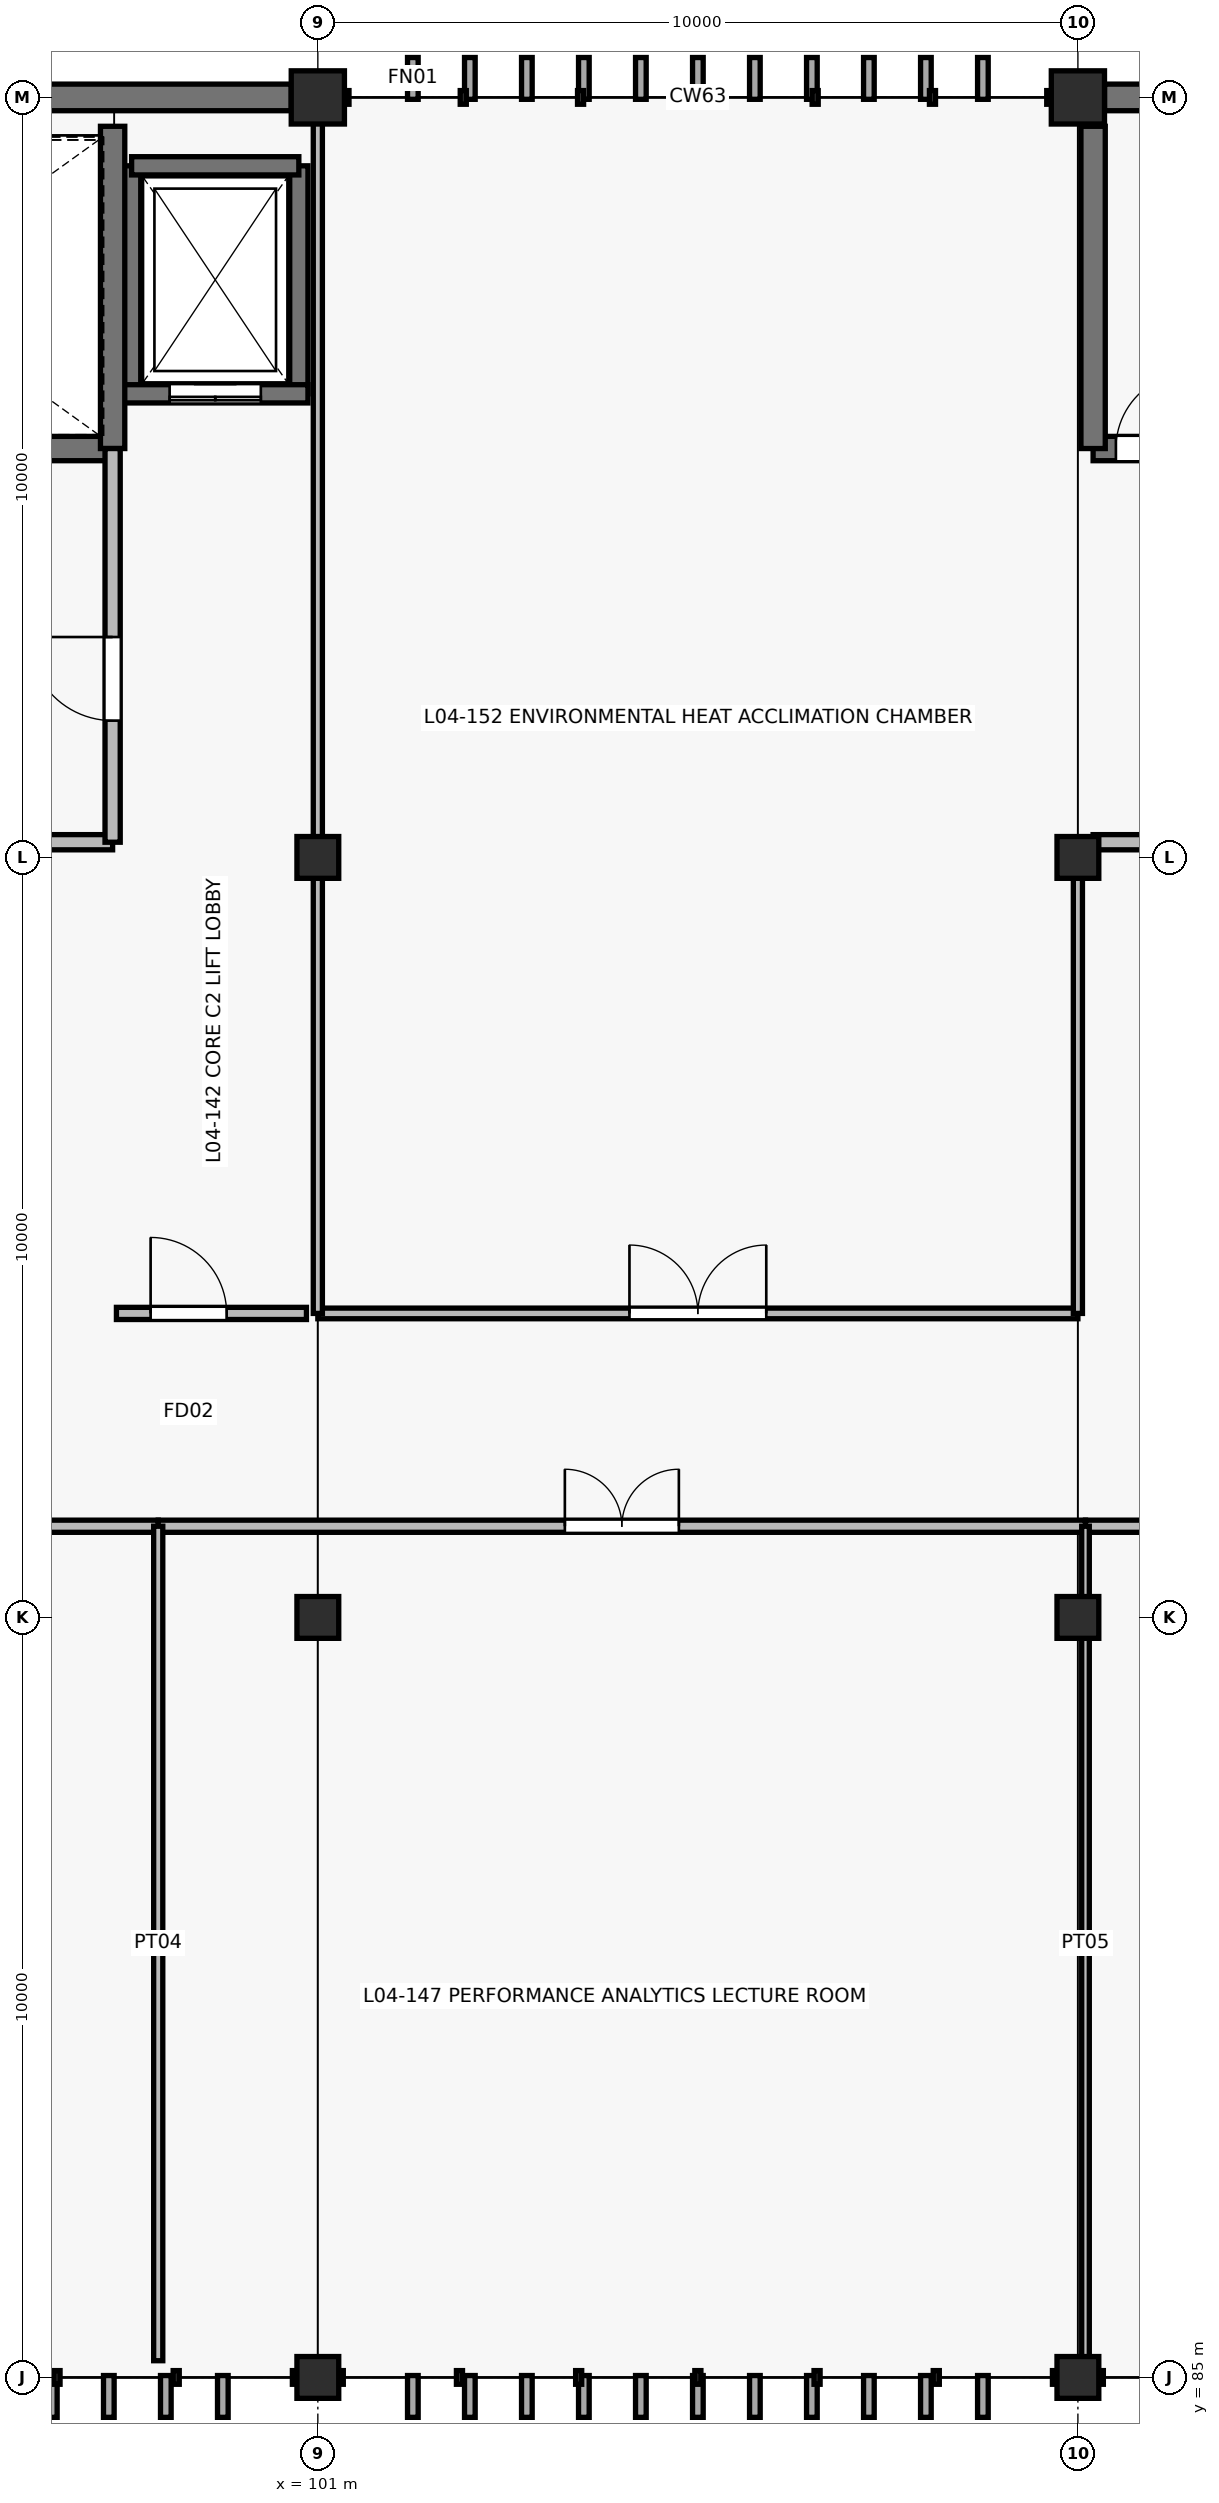
"""IFC4 building model, lengths in metres.
Left out: names, types, materials, properties, quantities, classifications, styles, units other than length and angle.
Written with IfcOpenShell. Run it as: python <this file> out.ifc"""

import sys

from ifc_helpers import new_model, si_unit, direction, frame, frame_2d, origin, origin_2d, place, context, subcontext, project, spatial, rectangle, circle, extrude, element, fill, save


model = new_model("IFC4")
c1 = context("Model", 3, precision=1e-05, world=origin(), true_north=direction((0.0, 1.0)))
c2 = subcontext(c1, "Body", "Model", "MODEL_VIEW")
j1 = project(units=[si_unit("LENGTHUNIT", "METRE"), si_unit("PLANEANGLEUNIT", "RADIAN")], contexts=[c1])
p1 = place(None, origin())
s1 = spatial("IfcSite", under=j1, at=p1, CompositionType="ELEMENT")
p2 = place(p1, origin())
s2 = spatial("IfcBuilding", under=s1, at=p2, CompositionType="ELEMENT")
p3 = place(p2, frame((0.0, 0.0, 17.4)))
s3 = spatial("IfcBuildingStorey", under=s2, at=p3, CompositionType="ELEMENT", Elevation=17.4)
for number, where, z_axis, x_axis in (
    (1, (101.0, 85.0, 0.0), (0.0, 0.0, 1.0), (1.0, 0.0, 0.0)),
    (2, (101.0, 95.0, 0.0), (0.0, 0.0, 1.0), (1.0, 0.0, 0.0)),
    (3, (101.0, 105.0, 0.0), (0.0, 0.0, 1.0), (1.0, 0.0, 0.0)),
):
    element("IfcColumn", number, at=place(p3, frame(where, z_axis=z_axis, x_axis=x_axis)), inside=s3, PredefinedType="COLUMN", context=c2, shape_type="SweptSolid", body=[
        extrude(rectangle(XDim=0.55, YDim=0.55, at=origin_2d()), origin(), (0.0, 0.0, 1.0), 4.2),
    ])
p4 = place(p3, frame((101.0, 115.0, 0.0), z_axis=(0.0, 0.0, 1.0), x_axis=(1.0, 0.0, 0.0)))
e4 = element("IfcColumn", 4, at=p4, inside=s3, PredefinedType="COLUMN", context=c2, shape_type="SweptSolid", body=[
    extrude(circle(Radius=0.35, at=origin_2d()), origin(), (0.0, 0.0, 1.0), 4.2),
])
for number, where, z_axis, x_axis in (
    (5, (111.0, 85.0, 0.0), (0.0, 0.0, 1.0), (1.0, 0.0, 0.0)),
    (6, (111.0, 95.0, 0.0), (0.0, 0.0, 1.0), (1.0, 0.0, 0.0)),
    (7, (111.0, 105.0, 0.0), (0.0, 0.0, 1.0), (1.0, 0.0, 0.0)),
):
    element("IfcColumn", number, at=place(p3, frame(where, z_axis=z_axis, x_axis=x_axis)), inside=s3, PredefinedType="COLUMN", context=c2, shape_type="SweptSolid", body=[
        extrude(rectangle(XDim=0.55, YDim=0.55, at=origin_2d()), origin(), (0.0, 0.0, 1.0), 4.2),
    ])
p5 = place(p3, frame((111.0, 115.0, 0.0), z_axis=(0.0, 0.0, 1.0), x_axis=(1.0, 0.0, 0.0)))
e8 = element("IfcColumn", 8, at=p5, inside=s3, PredefinedType="COLUMN", context=c2, shape_type="SweptSolid", body=[
    extrude(circle(Radius=0.35, at=origin_2d()), origin(), (0.0, 0.0, 1.0), 4.2),
])
p6 = place(p3, frame((91.35, 115.0, 0.0), z_axis=(0.0, 0.0, 1.0), x_axis=(1.0, 0.0, 0.0)))
e9 = element("IfcWall", 9, at=p6, inside=s3, PredefinedType="SOLIDWALL", context=c2, shape_type="SweptSolid", body=[
    extrude(rectangle(XDim=9.3, YDim=0.35, at=frame_2d((4.65, 0.0))), origin(), (0.0, 0.0, 1.0), 4.2),
])
p7 = place(p6, frame((2.2, 0.0, 1.0)))
e10 = element("IfcOpeningElement", 10, at=p7, cuts=e9, PredefinedType="OPENING", context=c2, shape_type="SweptSolid", body=[
    extrude(rectangle(XDim=2.4, YDim=1.5, at=frame_2d((1.2, 0.75))), frame((0.0, 0.185, 0.0), z_axis=(0.0, -1.0, 0.0), x_axis=(1.0, 0.0, 0.0)), (0.0, 0.0, 1.0), 0.37),
])
p8 = place(p3, frame((111.35, 115.0, 0.0), z_axis=(0.0, 0.0, 1.0), x_axis=(1.0, 0.0, 0.0)))
e11 = element("IfcWall", 11, at=p8, inside=s3, PredefinedType="SOLIDWALL", context=c2, shape_type="SweptSolid", body=[
    extrude(rectangle(XDim=9.3, YDim=0.35, at=frame_2d((4.65, 0.0))), origin(), (0.0, 0.0, 1.0), 4.2),
])
p9 = place(p8, frame((2.2, 0.0, 1.0)))
e12 = element("IfcOpeningElement", 12, at=p9, cuts=e11, PredefinedType="OPENING", context=c2, shape_type="SweptSolid", body=[
    extrude(rectangle(XDim=1.2, YDim=1.8, at=frame_2d((0.6, 0.9))), frame((0.0, 0.185, 0.0), z_axis=(0.0, -1.0, 0.0), x_axis=(1.0, 0.0, 0.0)), (0.0, 0.0, 1.0), 0.37),
])
for number, where, z_axis, x_axis in (
    (13, (98.55, 111.1, 0.0), (0.0, 0.0, 1.0), (0.0, 1.0, 0.0)),
    (14, (100.75, 114.1, 0.0), (0.0, 0.0, 1.0), (0.0, -1.0, 0.0)),
):
    element("IfcWall", number, at=place(p3, frame(where, z_axis=z_axis, x_axis=x_axis)), inside=s3, PredefinedType="SHEAR", context=c2, shape_type="SweptSolid", body=[
        extrude(rectangle(XDim=3.0, YDim=0.24, at=frame_2d((1.5, 0.0))), origin(), (0.0, 0.0, 1.0), 4.2),
    ])
p10 = place(p3, frame((98.55, 114.1, 0.0), z_axis=(0.0, 0.0, 1.0), x_axis=(1.0, 0.0, 0.0)))
e15 = element("IfcWall", 15, at=p10, inside=s3, PredefinedType="SHEAR", context=c2, shape_type="SweptSolid", body=[
    extrude(rectangle(XDim=2.2, YDim=0.24, at=frame_2d((1.1, 0.0))), origin(), (0.0, 0.0, 1.0), 4.2),
])
p11 = place(p3, frame((100.87, 111.1, 0.0), z_axis=(0.0, 0.0, 1.0), x_axis=(-1.0, 0.0, 0.0)))
e16 = element("IfcWall", 16, at=p11, inside=s3, PredefinedType="SHEAR", context=c2, shape_type="SweptSolid", body=[
    extrude(rectangle(XDim=2.44, YDim=0.24, at=frame_2d((1.22, 0.0))), origin(), (0.0, 0.0, 1.0), 4.2),
])
p12 = place(p11, frame((0.62, 0.0, 0.0)))
e17 = element("IfcOpeningElement", 17, at=p12, cuts=e16, PredefinedType="OPENING", context=c2, shape_type="SweptSolid", body=[
    extrude(rectangle(XDim=1.2, YDim=2.15, at=frame_2d((0.6, 1.075))), frame((0.0, 0.13, 0.0), z_axis=(0.0, -1.0, 0.0), x_axis=(1.0, 0.0, 0.0)), (0.0, 0.0, 1.0), 0.26),
])
p13 = place(p3, frame((91.2, 110.38, 0.0), z_axis=(0.0, 0.0, 1.0), x_axis=(1.0, 0.0, 0.0)))
e18 = element("IfcWall", 18, at=p13, inside=s3, PredefinedType="SHEAR", context=c2, shape_type="SweptSolid", body=[
    extrude(rectangle(XDim=7.1, YDim=0.32, at=frame_2d((3.55, 0.0))), origin(), (0.0, 0.0, 1.0), 4.2),
])
p14 = place(p13, frame((0.3, 0.0, 0.0)))
e19 = element("IfcOpeningElement", 19, at=p14, cuts=e18, PredefinedType="OPENING", context=c2, shape_type="SweptSolid", body=[
    extrude(rectangle(XDim=1.0, YDim=2.15, at=frame_2d((0.5, 1.075))), frame((0.0, 0.17, 0.0), z_axis=(0.0, -1.0, 0.0), x_axis=(1.0, 0.0, 0.0)), (0.0, 0.0, 1.0), 0.34),
])
p15 = place(p3, frame((98.3, 110.38, 0.0), z_axis=(0.0, 0.0, 1.0), x_axis=(0.0, 1.0, 0.0)))
e20 = element("IfcWall", 20, at=p15, inside=s3, PredefinedType="SHEAR", context=c2, shape_type="SweptSolid", body=[
    extrude(rectangle(XDim=4.24, YDim=0.32, at=frame_2d((2.12, 0.0))), origin(), (0.0, 0.0, 1.0), 4.2),
])
p16 = place(p3, frame((91.2, 105.2, 0.0), z_axis=(0.0, 0.0, 1.0), x_axis=(1.0, 0.0, 0.0)))
e21 = element("IfcWall", 21, at=p16, inside=s3, PredefinedType="PARTITIONING", context=c2, shape_type="SweptSolid", body=[
    extrude(rectangle(XDim=7.1, YDim=0.2, at=frame_2d((3.55, 0.0))), origin(), (0.0, 0.0, 1.0), 2.975),
])
p17 = place(p16, frame((2.2, 0.0, 0.0)))
e22 = element("IfcOpeningElement", 22, at=p17, cuts=e21, PredefinedType="OPENING", context=c2, shape_type="SweptSolid", body=[
    extrude(rectangle(XDim=1.6, YDim=2.2, at=frame_2d((0.8, 1.1))), frame((0.0, 0.11, 0.0), z_axis=(0.0, -1.0, 0.0), x_axis=(1.0, 0.0, 0.0)), (0.0, 0.0, 1.0), 0.22),
])
p18 = place(p3, frame((98.3, 105.2, 0.0), z_axis=(0.0, 0.0, 1.0), x_axis=(0.0, 1.0, 0.0)))
e23 = element("IfcWall", 23, at=p18, inside=s3, PredefinedType="PARTITIONING", context=c2, shape_type="SweptSolid", body=[
    extrude(rectangle(XDim=5.18, YDim=0.2, at=frame_2d((2.59, 0.0))), origin(), (0.0, 0.0, 1.0), 2.975),
])
p19 = place(p18, frame((1.6, 0.0, 0.0)))
e24 = element("IfcOpeningElement", 24, at=p19, cuts=e23, PredefinedType="OPENING", context=c2, shape_type="SweptSolid", body=[
    extrude(rectangle(XDim=1.1, YDim=2.15, at=frame_2d((0.55, 1.075))), frame((0.0, 0.11, 0.0), z_axis=(0.0, -1.0, 0.0), x_axis=(1.0, 0.0, 0.0)), (0.0, 0.0, 1.0), 0.22),
])
p20 = place(p3, frame((98.35, 99.0, 0.0), z_axis=(0.0, 0.0, 1.0), x_axis=(1.0, 0.0, 0.0)))
e25 = element("IfcWall", 25, at=p20, inside=s3, PredefinedType="PARTITIONING", context=c2, shape_type="SweptSolid", body=[
    extrude(rectangle(XDim=2.5, YDim=0.16, at=frame_2d((1.25, 0.0))), origin(), (0.0, 0.0, 1.0), 2.975),
])
p21 = place(p20, frame((0.45, 0.0, 0.0)))
e26 = element("IfcOpeningElement", 26, at=p21, cuts=e25, PredefinedType="OPENING", context=c2, shape_type="SweptSolid", body=[
    extrude(rectangle(XDim=1.0, YDim=2.15, at=frame_2d((0.5, 1.075))), frame((0.0, 0.09, 0.0), z_axis=(0.0, -1.0, 0.0), x_axis=(1.0, 0.0, 0.0)), (0.0, 0.0, 1.0), 0.18),
])
p22 = place(p3, frame((111.2, 110.38, 0.0), z_axis=(0.0, 0.0, 1.0), x_axis=(1.0, 0.0, 0.0)))
e27 = element("IfcWall", 27, at=p22, inside=s3, PredefinedType="SHEAR", context=c2, shape_type="SweptSolid", body=[
    extrude(rectangle(XDim=7.1, YDim=0.32, at=frame_2d((3.55, 0.0))), origin(), (0.0, 0.0, 1.0), 4.2),
])
p23 = place(p22, frame((0.3, 0.0, 0.0)))
e28 = element("IfcOpeningElement", 28, at=p23, cuts=e27, PredefinedType="OPENING", context=c2, shape_type="SweptSolid", body=[
    extrude(rectangle(XDim=1.0, YDim=2.15, at=frame_2d((0.5, 1.075))), frame((0.0, 0.17, 0.0), z_axis=(0.0, -1.0, 0.0), x_axis=(1.0, 0.0, 0.0)), (0.0, 0.0, 1.0), 0.34),
])
p24 = place(p3, frame((111.2, 114.62, 0.0), z_axis=(0.0, 0.0, 1.0), x_axis=(0.0, -1.0, 0.0)))
e29 = element("IfcWall", 29, at=p24, inside=s3, PredefinedType="SHEAR", context=c2, shape_type="SweptSolid", body=[
    extrude(rectangle(XDim=4.24, YDim=0.32, at=frame_2d((2.12, 0.0))), origin(), (0.0, 0.0, 1.0), 4.2),
])
p25 = place(p3, frame((111.2, 105.2, 0.0), z_axis=(0.0, 0.0, 1.0), x_axis=(1.0, 0.0, 0.0)))
e30 = element("IfcWall", 30, at=p25, inside=s3, PredefinedType="PARTITIONING", context=c2, shape_type="SweptSolid", body=[
    extrude(rectangle(XDim=7.1, YDim=0.2, at=frame_2d((3.55, 0.0))), origin(), (0.0, 0.0, 1.0), 2.975),
])
p26 = place(p25, frame((2.2, 0.0, 0.0)))
e31 = element("IfcOpeningElement", 31, at=p26, cuts=e30, PredefinedType="OPENING", context=c2, shape_type="SweptSolid", body=[
    extrude(rectangle(XDim=1.6, YDim=2.2, at=frame_2d((0.8, 1.1))), frame((0.0, 0.11, 0.0), z_axis=(0.0, -1.0, 0.0), x_axis=(1.0, 0.0, 0.0)), (0.0, 0.0, 1.0), 0.22),
])
p27 = place(p3, frame((79.1, 96.2, 0.0), z_axis=(0.0, 0.0, 1.0), x_axis=(1.0, 0.0, 0.0)))
e32 = element("IfcWall", 32, at=p27, inside=s3, PredefinedType="PARTITIONING", context=c2, shape_type="SweptSolid", body=[
    extrude(rectangle(XDim=19.8, YDim=0.16, at=frame_2d((9.9, 0.0))), origin(), (0.0, 0.0, 1.0), 2.975),
])
p28 = place(p27, frame((8.2, 0.0, 0.0)))
e33 = element("IfcOpeningElement", 33, at=p28, cuts=e32, PredefinedType="OPENING", context=c2, shape_type="SweptSolid", body=[
    extrude(rectangle(XDim=1.4, YDim=2.2, at=frame_2d((0.7, 1.1))), frame((0.0, 0.09, 0.0), z_axis=(0.0, -1.0, 0.0), x_axis=(1.0, 0.0, 0.0)), (0.0, 0.0, 1.0), 0.18),
])
p29 = place(p3, frame((98.9, 96.2, 0.0), z_axis=(0.0, 0.0, 1.0), x_axis=(1.0, 0.0, 0.0)))
e34 = element("IfcWall", 34, at=p29, inside=s3, PredefinedType="PARTITIONING", context=c2, shape_type="SweptSolid", body=[
    extrude(rectangle(XDim=12.2, YDim=0.16, at=frame_2d((6.1, 0.0))), origin(), (0.0, 0.0, 1.0), 2.975),
])
p30 = place(p29, frame((5.35, 0.0, 0.0)))
e35 = element("IfcOpeningElement", 35, at=p30, cuts=e34, PredefinedType="OPENING", context=c2, shape_type="SweptSolid", body=[
    extrude(rectangle(XDim=1.5, YDim=2.2, at=frame_2d((0.75, 1.1))), frame((0.0, 0.09, 0.0), z_axis=(0.0, -1.0, 0.0), x_axis=(1.0, 0.0, 0.0)), (0.0, 0.0, 1.0), 0.18),
])
p31 = place(p3, frame((98.9, 85.22, 0.0), z_axis=(0.0, 0.0, 1.0), x_axis=(0.0, 1.0, 0.0)))
e36 = element("IfcWall", 36, at=p31, inside=s3, PredefinedType="PARTITIONING", context=c2, shape_type="SweptSolid", body=[
    extrude(rectangle(XDim=10.98, YDim=0.12, at=frame_2d((5.49, 0.0))), origin(), (0.0, 0.0, 1.0), 2.975),
])
p32 = place(p3, frame((111.1, 96.2, 0.0), z_axis=(0.0, 0.0, 1.0), x_axis=(1.0, 0.0, 0.0)))
e37 = element("IfcWall", 37, at=p32, inside=s3, PredefinedType="PARTITIONING", context=c2, shape_type="SweptSolid", body=[
    extrude(rectangle(XDim=5.0, YDim=0.16, at=frame_2d((2.5, 0.0))), origin(), (0.0, 0.0, 1.0), 2.975),
])
p33 = place(p32, frame((2.0, 0.0, 0.0)))
e38 = element("IfcOpeningElement", 38, at=p33, cuts=e37, PredefinedType="OPENING", context=c2, shape_type="SweptSolid", body=[
    extrude(rectangle(XDim=0.98, YDim=2.1, at=frame_2d((0.49, 1.05))), frame((0.0, 0.09, 0.0), z_axis=(0.0, -1.0, 0.0), x_axis=(1.0, 0.0, 0.0)), (0.0, 0.0, 1.0), 0.18),
])
p34 = place(p3, frame((111.1, 85.22, 0.0), z_axis=(0.0, 0.0, 1.0), x_axis=(0.0, 1.0, 0.0)))
e39 = element("IfcWall", 39, at=p34, inside=s3, PredefinedType="PARTITIONING", context=c2, shape_type="SweptSolid", body=[
    extrude(rectangle(XDim=10.98, YDim=0.1, at=frame_2d((5.49, 0.0))), origin(), (0.0, 0.0, 1.0), 2.975),
])
p35 = place(p3, frame((101.0, 99.0, 0.0), z_axis=(0.0, 0.0, 1.0), x_axis=(1.0, 0.0, 0.0)))
e40 = element("IfcWall", 40, at=p35, inside=s3, PredefinedType="PARTITIONING", context=c2, shape_type="SweptSolid", body=[
    extrude(rectangle(XDim=10.0, YDim=0.14, at=frame_2d((5.0, 0.0))), origin(), (0.0, 0.0, 1.0), 2.975),
])
p36 = place(p35, frame((4.1, 0.0, 0.0)))
e41 = element("IfcOpeningElement", 41, at=p36, cuts=e40, PredefinedType="OPENING", context=c2, shape_type="SweptSolid", body=[
    extrude(rectangle(XDim=1.8, YDim=2.25, at=frame_2d((0.9, 1.125))), frame((0.0, 0.08, 0.0), z_axis=(0.0, -1.0, 0.0), x_axis=(1.0, 0.0, 0.0)), (0.0, 0.0, 1.0), 0.16),
])
p37 = place(p3, frame((101.0, 99.0, 0.0), z_axis=(0.0, 0.0, 1.0), x_axis=(0.0, 1.0, 0.0)))
e42 = element("IfcWall", 42, at=p37, inside=s3, PredefinedType="PARTITIONING", context=c2, shape_type="SweptSolid", body=[
    extrude(rectangle(XDim=15.75, YDim=0.12, at=frame_2d((7.875, 0.0))), origin(), (0.0, 0.0, 1.0), 2.975),
])
p38 = place(p3, frame((111.0, 99.0, 0.0), z_axis=(0.0, 0.0, 1.0), x_axis=(0.0, 1.0, 0.0)))
e43 = element("IfcWall", 43, at=p38, inside=s3, PredefinedType="PARTITIONING", context=c2, shape_type="SweptSolid", body=[
    extrude(rectangle(XDim=6.2, YDim=0.12, at=frame_2d((3.1, 0.0))), origin(), (0.0, 0.0, 1.0), 2.975),
])
p39 = place(p12, origin())
e44 = element("IfcDoor", 44, at=p39, inside=s3, OperationType="DOUBLE_DOOR_SLIDING", PredefinedType="USERDEFINED", context=c2, shape_type="SweptSolid", body=[
    extrude(rectangle(XDim=1.2, YDim=2.15, at=frame_2d((0.6, 1.075))), frame((0.0, 0.025, 0.0), z_axis=(0.0, -1.0, 0.0), x_axis=(1.0, 0.0, 0.0)), (0.0, 0.0, 1.0), 0.05),
])
fill(e17, e44)
p40 = place(p19, origin())
e45 = element("IfcDoor", 45, at=p40, inside=s3, OperationType="SINGLE_SWING_RIGHT", PredefinedType="DOOR", context=c2, shape_type="SweptSolid", body=[
    extrude(rectangle(XDim=1.1, YDim=2.15, at=frame_2d((0.55, 1.075))), frame((0.0, 0.025, 0.0), z_axis=(0.0, -1.0, 0.0), x_axis=(1.0, 0.0, 0.0)), (0.0, 0.0, 1.0), 0.05),
])
fill(e24, e45)
p41 = place(p21, origin())
e46 = element("IfcDoor", 46, at=p41, inside=s3, OperationType="SINGLE_SWING_LEFT", PredefinedType="DOOR", context=c2, shape_type="SweptSolid", body=[
    extrude(rectangle(XDim=1.0, YDim=2.15, at=frame_2d((0.5, 1.075))), frame((0.0, 0.025, 0.0), z_axis=(0.0, -1.0, 0.0), x_axis=(1.0, 0.0, 0.0)), (0.0, 0.0, 1.0), 0.05),
])
fill(e26, e46)
p42 = place(p23, origin())
e47 = element("IfcDoor", 47, at=p42, inside=s3, OperationType="SINGLE_SWING_RIGHT", PredefinedType="DOOR", context=c2, shape_type="SweptSolid", body=[
    extrude(rectangle(XDim=1.0, YDim=2.15, at=frame_2d((0.5, 1.075))), frame((0.0, 0.025, 0.0), z_axis=(0.0, -1.0, 0.0), x_axis=(1.0, 0.0, 0.0)), (0.0, 0.0, 1.0), 0.05),
])
fill(e28, e47)
p43 = place(p30, origin())
e48 = element("IfcDoor", 48, at=p43, inside=s3, OperationType="DOUBLE_DOOR_SINGLE_SWING", PredefinedType="DOOR", context=c2, shape_type="SweptSolid", body=[
    extrude(rectangle(XDim=1.5, YDim=2.2, at=frame_2d((0.75, 1.1))), frame((0.0, 0.025, 0.0), z_axis=(0.0, -1.0, 0.0), x_axis=(1.0, 0.0, 0.0)), (0.0, 0.0, 1.0), 0.05),
])
fill(e35, e48)
p44 = place(p36, origin())
e49 = element("IfcDoor", 49, at=p44, inside=s3, OperationType="DOUBLE_DOOR_SINGLE_SWING", PredefinedType="DOOR", context=c2, shape_type="SweptSolid", body=[
    extrude(rectangle(XDim=1.8, YDim=2.25, at=frame_2d((0.9, 1.125))), frame((0.0, 0.025, 0.0), z_axis=(0.0, -1.0, 0.0), x_axis=(1.0, 0.0, 0.0)), (0.0, 0.0, 1.0), 0.05),
])
fill(e41, e49)
save(model, sys.argv[1])
